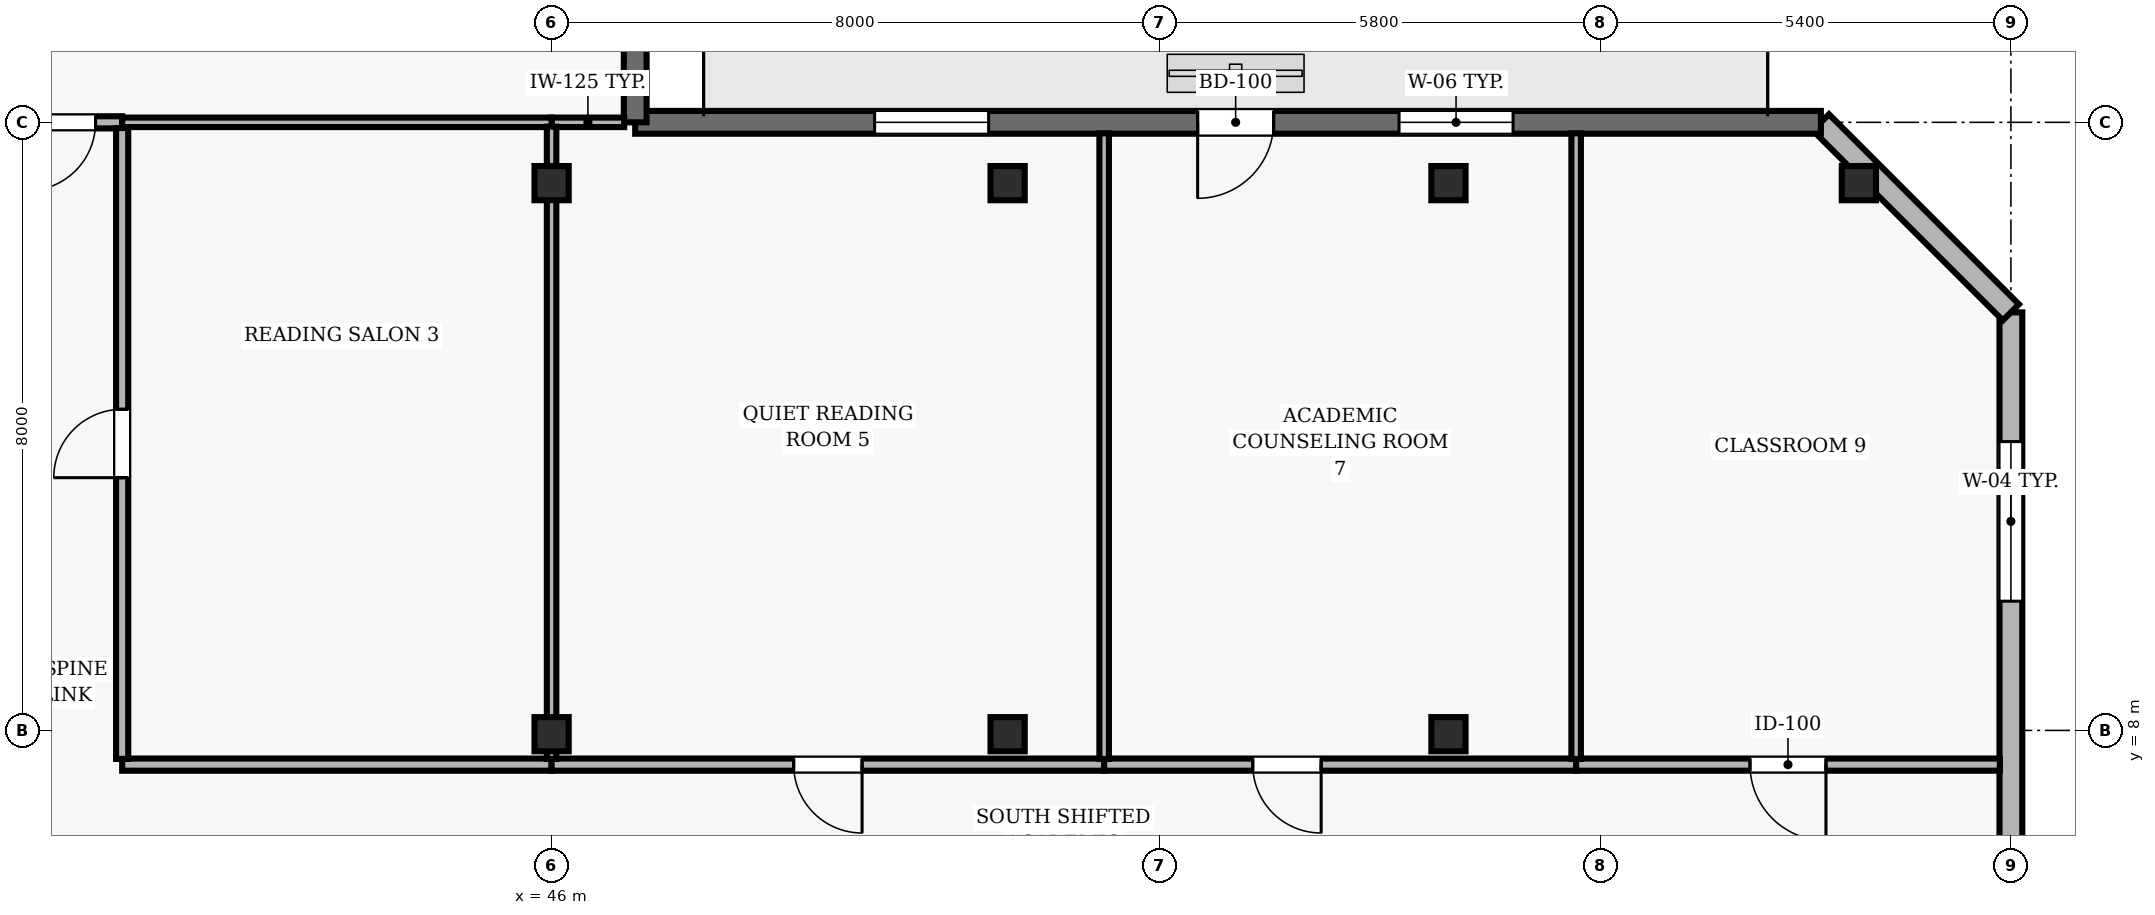
"""IFC4 building model, lengths in metres.
Left out: names, types, materials, properties, quantities, classifications, styles, units other than length and angle.
Written with IfcOpenShell. Run it as: python <this file> out.ifc"""

import sys

from ifc_helpers import new_model, si_unit, direction, frame, frame_2d, origin, origin_2d, place, context, subcontext, project, spatial, rectangle, hollow_rectangle, extrude, element, fill, save


model = new_model("IFC4")
c1 = context("Model", 3, precision=1e-05, world=origin(), true_north=direction((0.0, 1.0)))
c2 = subcontext(c1, "Body", "Model", "MODEL_VIEW")
j1 = project(units=[si_unit("LENGTHUNIT", "METRE"), si_unit("PLANEANGLEUNIT", "RADIAN")], contexts=[c1])
p1 = place(None, origin())
s1 = spatial("IfcSite", under=j1, at=p1, CompositionType="ELEMENT")
p2 = place(p1, origin())
s2 = spatial("IfcBuilding", under=s1, at=p2, CompositionType="ELEMENT")
p3 = place(p2, frame((0.0, 0.0, 203.1)))
s3 = spatial("IfcBuildingStorey", under=s2, at=p3, CompositionType="ELEMENT", Elevation=203.1)
for number, where, z_axis, x_axis in (
    (1, (46.0, 7.95, 0.0), (0.0, 0.0, 1.0), (1.0, 0.0, 0.0)),
    (2, (46.0, 15.2, 0.0), (0.0, 0.0, 1.0), (1.0, 0.0, 0.0)),
    (3, (52.0, 7.95, 0.0), (0.0, 0.0, 1.0), (1.0, 0.0, 0.0)),
    (4, (52.0, 15.2, 0.0), (0.0, 0.0, 1.0), (1.0, 0.0, 0.0)),
    (5, (57.8, 7.95, 0.0), (0.0, 0.0, 1.0), (1.0, 0.0, 0.0)),
    (6, (57.8, 15.2, 0.0), (0.0, 0.0, 1.0), (1.0, 0.0, 0.0)),
    (7, (63.2, 15.2, 0.0), (0.0, 0.0, 1.0), (1.0, 0.0, 0.0)),
):
    element("IfcColumn", number, at=place(p3, frame(where, z_axis=z_axis, x_axis=x_axis)), inside=s3, PredefinedType="COLUMN", context=c2, shape_type="SweptSolid", body=[
        extrude(hollow_rectangle(XDim=0.45, YDim=0.45, WallThickness=0.02, at=origin_2d()), origin(), (0.0, 0.0, 1.0), 3.9),
    ])
p4 = place(p3, frame((65.2, 2.5, 0.0), z_axis=(0.0, 0.0, 1.0), x_axis=(0.0, 1.0, 0.0)))
e8 = element("IfcWall", 8, at=p4, inside=s3, PredefinedType="SOLIDWALL", context=c2, shape_type="SweptSolid", body=[
    extrude(rectangle(XDim=11.0, YDim=0.3, at=frame_2d((5.5, 0.0))), origin(), (0.0, 0.0, 1.0), 3.69),
])
p5 = place(p4, frame((7.2, 0.0, 0.9)))
e9 = element("IfcOpeningElement", 9, at=p5, cuts=e8, PredefinedType="OPENING", context=c2, shape_type="SweptSolid", body=[
    extrude(rectangle(XDim=2.1, YDim=1.6, at=frame_2d((1.05, 0.8))), frame((0.0, 0.16, 0.0), z_axis=(0.0, -1.0, 0.0), x_axis=(1.0, 0.0, 0.0)), (0.0, 0.0, 1.0), 0.32),
])
p6 = place(p3, frame((65.2, 13.5, 0.0), z_axis=(0.0, 0.0, 1.0), x_axis=(-0.707106781187, 0.707106781187, 0.0)))
e10 = element("IfcWall", 10, at=p6, inside=s3, PredefinedType="SOLIDWALL", context=c2, shape_type="SweptSolid", body=[
    extrude(rectangle(XDim=3.536, YDim=0.3, at=frame_2d((1.768, 0.0))), origin(), (0.0, 0.0, 1.0), 3.69),
])
p7 = place(p3, frame((62.7, 16.0, 0.0), z_axis=(0.0, 0.0, 1.0), x_axis=(-1.0, 0.0, 0.0)))
e11 = element("IfcWall", 11, at=p7, inside=s3, PredefinedType="SOLIDWALL", context=c2, shape_type="SweptSolid", body=[
    extrude(rectangle(XDim=15.6, YDim=0.3, at=frame_2d((7.8, 0.0))), origin(), (0.0, 0.0, 1.0), 3.69),
])
p8 = place(p7, frame((7.2, 0.0, 0.0)))
e12 = element("IfcOpeningElement", 12, at=p8, cuts=e11, PredefinedType="OPENING", context=c2, shape_type="SweptSolid", body=[
    extrude(rectangle(XDim=1.0, YDim=2.2, at=frame_2d((0.5, 1.1))), frame((0.0, 0.16, 0.0), z_axis=(0.0, -1.0, 0.0), x_axis=(1.0, 0.0, 0.0)), (0.0, 0.0, 1.0), 0.32),
])
p9 = place(p7, frame((4.05, 0.0, 0.9)))
e13 = element("IfcOpeningElement", 13, at=p9, cuts=e11, PredefinedType="OPENING", context=c2, shape_type="SweptSolid", body=[
    extrude(rectangle(XDim=1.5, YDim=1.8, at=frame_2d((0.75, 0.9))), frame((0.0, 0.16, 0.0), z_axis=(0.0, -1.0, 0.0), x_axis=(1.0, 0.0, 0.0)), (0.0, 0.0, 1.0), 0.32),
])
p10 = place(p7, frame((10.95, 0.0, 0.9)))
e14 = element("IfcOpeningElement", 14, at=p10, cuts=e11, PredefinedType="OPENING", context=c2, shape_type="SweptSolid", body=[
    extrude(rectangle(XDim=1.5, YDim=1.8, at=frame_2d((0.75, 0.9))), frame((0.0, 0.16, 0.0), z_axis=(0.0, -1.0, 0.0), x_axis=(1.0, 0.0, 0.0)), (0.0, 0.0, 1.0), 0.32),
])
p11 = place(p3, frame((47.1, 16.0, 0.0), z_axis=(0.0, 0.0, 1.0), x_axis=(0.0, 1.0, 0.0)))
e15 = element("IfcWall", 15, at=p11, inside=s3, PredefinedType="SOLIDWALL", context=c2, shape_type="SweptSolid", body=[
    extrude(rectangle(XDim=6.135, YDim=0.3, at=frame_2d((3.067, 0.0))), origin(), (0.0, 0.0, 1.0), 3.69),
])
p12 = place(p11, frame((2.168, 0.0, 0.9)))
e16 = element("IfcOpeningElement", 16, at=p12, cuts=e15, PredefinedType="OPENING", context=c2, shape_type="SweptSolid", body=[
    extrude(rectangle(XDim=1.8, YDim=1.8, at=frame_2d((0.9, 0.9))), frame((0.0, 0.16, 0.0), z_axis=(0.0, -1.0, 0.0), x_axis=(1.0, 0.0, 0.0)), (0.0, 0.0, 1.0), 0.32),
])
p13 = place(p3, frame((40.35, 16.0, 0.0), z_axis=(0.0, 0.0, 1.0), x_axis=(-1.0, 0.0, 0.0)))
e17 = element("IfcWall", 17, at=p13, inside=s3, PredefinedType="PARTITIONING", context=c2, shape_type="SweptSolid", body=[
    extrude(rectangle(XDim=2.3, YDim=0.16, at=frame_2d((1.15, 0.0))), origin(), (0.0, 0.0, 1.0), 3.39),
])
p14 = place(p13, frame((0.35, 0.0, 0.0)))
e18 = element("IfcOpeningElement", 18, at=p14, cuts=e17, PredefinedType="OPENING", context=c2, shape_type="SweptSolid", body=[
    extrude(rectangle(XDim=0.9, YDim=2.1, at=frame_2d((0.45, 1.05))), frame((0.0, 0.09, 0.0), z_axis=(0.0, -1.0, 0.0), x_axis=(1.0, 0.0, 0.0)), (0.0, 0.0, 1.0), 0.18),
])
p15 = place(p3, frame((46.0, 7.55, 0.0), z_axis=(0.0, 0.0, 1.0), x_axis=(-1.0, 0.0, 0.0)))
e19 = element("IfcWall", 19, at=p15, inside=s3, PredefinedType="PARTITIONING", context=c2, shape_type="SweptSolid", body=[
    extrude(rectangle(XDim=5.65, YDim=0.16, at=frame_2d((2.825, 0.0))), origin(), (0.0, 0.0, 1.0), 3.146),
])
p16 = place(p3, frame((46.0, 16.0, 0.0), z_axis=(0.0, 0.0, 1.0), x_axis=(1.0, 0.0, 0.0)))
e20 = element("IfcWall", 20, at=p16, inside=s3, PredefinedType="PARTITIONING", context=c2, shape_type="SweptSolid", body=[
    extrude(rectangle(XDim=0.955, YDim=0.125, at=frame_2d((0.478, 0.0))), origin(), (0.0, 0.0, 1.0), 3.39),
])
p17 = place(p3, frame((46.0, 16.0, 0.0), z_axis=(0.0, 0.0, 1.0), x_axis=(-1.0, 0.0, 0.0)))
e21 = element("IfcWall", 21, at=p17, inside=s3, PredefinedType="PARTITIONING", context=c2, shape_type="SweptSolid", body=[
    extrude(rectangle(XDim=5.65, YDim=0.125, at=frame_2d((2.825, 0.0))), origin(), (0.0, 0.0, 1.0), 3.39),
])
p18 = place(p3, frame((53.27, 7.55, 0.0), z_axis=(0.0, 0.0, 1.0), x_axis=(-1.0, 0.0, 0.0)))
e22 = element("IfcWall", 22, at=p18, inside=s3, PredefinedType="PARTITIONING", context=c2, shape_type="SweptSolid", body=[
    extrude(rectangle(XDim=7.27, YDim=0.16, at=frame_2d((3.635, 0.0))), origin(), (0.0, 0.0, 1.0), 3.146),
])
p19 = place(p18, frame((3.185, 0.0, 0.0)))
e23 = element("IfcOpeningElement", 23, at=p19, cuts=e22, PredefinedType="OPENING", context=c2, shape_type="SweptSolid", body=[
    extrude(rectangle(XDim=0.9, YDim=2.1, at=frame_2d((0.45, 1.05))), frame((0.0, 0.09, 0.0), z_axis=(0.0, -1.0, 0.0), x_axis=(1.0, 0.0, 0.0)), (0.0, 0.0, 1.0), 0.18),
])
p20 = place(p3, frame((59.48, 7.55, 0.0), z_axis=(0.0, 0.0, 1.0), x_axis=(-1.0, 0.0, 0.0)))
e24 = element("IfcWall", 24, at=p20, inside=s3, PredefinedType="PARTITIONING", context=c2, shape_type="SweptSolid", body=[
    extrude(rectangle(XDim=6.21, YDim=0.16, at=frame_2d((3.105, 0.0))), origin(), (0.0, 0.0, 1.0), 3.146),
])
p21 = place(p20, frame((3.355, 0.0, 0.0)))
e25 = element("IfcOpeningElement", 25, at=p21, cuts=e24, PredefinedType="OPENING", context=c2, shape_type="SweptSolid", body=[
    extrude(rectangle(XDim=0.9, YDim=2.1, at=frame_2d((0.45, 1.05))), frame((0.0, 0.09, 0.0), z_axis=(0.0, -1.0, 0.0), x_axis=(1.0, 0.0, 0.0)), (0.0, 0.0, 1.0), 0.18),
])
p22 = place(p3, frame((65.055, 7.55, 0.0), z_axis=(0.0, 0.0, 1.0), x_axis=(-1.0, 0.0, 0.0)))
e26 = element("IfcWall", 26, at=p22, inside=s3, PredefinedType="PARTITIONING", context=c2, shape_type="SweptSolid", body=[
    extrude(rectangle(XDim=5.575, YDim=0.16, at=frame_2d((2.788, 0.0))), origin(), (0.0, 0.0, 1.0), 3.69),
])
p23 = place(p22, frame((2.288, 0.0, 0.0)))
e27 = element("IfcOpeningElement", 27, at=p23, cuts=e26, PredefinedType="OPENING", context=c2, shape_type="SweptSolid", body=[
    extrude(rectangle(XDim=1.0, YDim=2.1, at=frame_2d((0.5, 1.05))), frame((0.0, 0.09, 0.0), z_axis=(0.0, -1.0, 0.0), x_axis=(1.0, 0.0, 0.0)), (0.0, 0.0, 1.0), 0.18),
])
p24 = place(p3, frame((40.35, 7.625, 0.0), z_axis=(0.0, 0.0, 1.0), x_axis=(0.0, 1.0, 0.0)))
e28 = element("IfcWall", 28, at=p24, inside=s3, PredefinedType="PARTITIONING", context=c2, shape_type="SweptSolid", body=[
    extrude(rectangle(XDim=8.3, YDim=0.16, at=frame_2d((4.15, 0.0))), origin(), (0.0, 0.0, 1.0), 3.372),
])
p25 = place(p24, frame((3.7, 0.0, 0.0)))
e29 = element("IfcOpeningElement", 29, at=p25, cuts=e28, PredefinedType="OPENING", context=c2, shape_type="SweptSolid", body=[
    extrude(rectangle(XDim=0.9, YDim=2.1, at=frame_2d((0.45, 1.05))), frame((0.0, 0.09, 0.0), z_axis=(0.0, -1.0, 0.0), x_axis=(1.0, 0.0, 0.0)), (0.0, 0.0, 1.0), 0.18),
])
p26 = place(p3, frame((46.0, 7.625, 0.0), z_axis=(0.0, 0.0, 1.0), x_axis=(0.0, 1.0, 0.0)))
e30 = element("IfcWall", 30, at=p26, inside=s3, PredefinedType="PARTITIONING", context=c2, shape_type="SweptSolid", body=[
    extrude(rectangle(XDim=8.318, YDim=0.125, at=frame_2d((4.159, 0.0))), origin(), (0.0, 0.0, 1.0), 3.146),
])
for number, where, z_axis, x_axis in (
    (31, (53.27, 7.625, 0.0), (0.0, 0.0, 1.0), (0.0, 1.0, 0.0)),
    (32, (59.48, 7.625, 0.0), (0.0, 0.0, 1.0), (0.0, 1.0, 0.0)),
):
    element("IfcWall", number, at=place(p3, frame(where, z_axis=z_axis, x_axis=x_axis)), inside=s3, PredefinedType="PARTITIONING", context=c2, shape_type="SweptSolid", body=[
        extrude(rectangle(XDim=8.23, YDim=0.125, at=frame_2d((4.115, 0.0))), origin(), (0.0, 0.0, 1.0), 3.69),
    ])
p27 = place(p5, origin())
e33 = element("IfcWindow", 33, at=p27, inside=s3, PartitioningType="SINGLE_PANEL", PredefinedType="WINDOW", context=c2, shape_type="SweptSolid", body=[
    extrude(rectangle(XDim=2.1, YDim=1.6, at=frame_2d((1.05, 0.8))), frame((0.0, 0.03, 0.0), z_axis=(0.0, -1.0, 0.0), x_axis=(1.0, 0.0, 0.0)), (0.0, 0.0, 1.0), 0.06),
])
fill(e9, e33)
p28 = place(p8, origin())
e34 = element("IfcDoor", 34, at=p28, inside=s3, OperationType="SINGLE_SWING_RIGHT", PredefinedType="DOOR", context=c2, shape_type="SweptSolid", body=[
    extrude(rectangle(XDim=1.0, YDim=2.2, at=frame_2d((0.5, 1.1))), frame((0.0, 0.025, 0.0), z_axis=(0.0, -1.0, 0.0), x_axis=(1.0, 0.0, 0.0)), (0.0, 0.0, 1.0), 0.05),
])
fill(e12, e34)
p29 = place(p9, origin())
e35 = element("IfcWindow", 35, at=p29, inside=s3, PartitioningType="SINGLE_PANEL", PredefinedType="WINDOW", context=c2, shape_type="SweptSolid", body=[
    extrude(rectangle(XDim=1.5, YDim=1.8, at=frame_2d((0.75, 0.9))), frame((0.0, 0.03, 0.0), z_axis=(0.0, -1.0, 0.0), x_axis=(1.0, 0.0, 0.0)), (0.0, 0.0, 1.0), 0.06),
])
fill(e13, e35)
p30 = place(p10, origin())
e36 = element("IfcWindow", 36, at=p30, inside=s3, PartitioningType="SINGLE_PANEL", PredefinedType="WINDOW", context=c2, shape_type="SweptSolid", body=[
    extrude(rectangle(XDim=1.5, YDim=1.8, at=frame_2d((0.75, 0.9))), frame((0.0, 0.03, 0.0), z_axis=(0.0, -1.0, 0.0), x_axis=(1.0, 0.0, 0.0)), (0.0, 0.0, 1.0), 0.06),
])
fill(e14, e36)
p31 = place(p25, origin())
e37 = element("IfcDoor", 37, at=p31, inside=s3, OperationType="SINGLE_SWING_LEFT", PredefinedType="DOOR", context=c2, shape_type="SweptSolid", body=[
    extrude(rectangle(XDim=0.9, YDim=2.1, at=frame_2d((0.45, 1.05))), frame((0.0, 0.025, 0.0), z_axis=(0.0, -1.0, 0.0), x_axis=(1.0, 0.0, 0.0)), (0.0, 0.0, 1.0), 0.05),
])
fill(e29, e37)
p32 = place(p19, origin())
e38 = element("IfcDoor", 38, at=p32, inside=s3, OperationType="SINGLE_SWING_LEFT", PredefinedType="DOOR", context=c2, shape_type="SweptSolid", body=[
    extrude(rectangle(XDim=0.9, YDim=2.1, at=frame_2d((0.45, 1.05))), frame((0.0, 0.025, 0.0), z_axis=(0.0, -1.0, 0.0), x_axis=(1.0, 0.0, 0.0)), (0.0, 0.0, 1.0), 0.05),
])
fill(e23, e38)
p33 = place(p21, origin())
e39 = element("IfcDoor", 39, at=p33, inside=s3, OperationType="SINGLE_SWING_LEFT", PredefinedType="DOOR", context=c2, shape_type="SweptSolid", body=[
    extrude(rectangle(XDim=0.9, YDim=2.1, at=frame_2d((0.45, 1.05))), frame((0.0, 0.025, 0.0), z_axis=(0.0, -1.0, 0.0), x_axis=(1.0, 0.0, 0.0)), (0.0, 0.0, 1.0), 0.05),
])
fill(e25, e39)
p34 = place(p23, origin())
e40 = element("IfcDoor", 40, at=p34, inside=s3, OperationType="SINGLE_SWING_LEFT", PredefinedType="DOOR", context=c2, shape_type="SweptSolid", body=[
    extrude(rectangle(XDim=1.0, YDim=2.1, at=frame_2d((0.5, 1.05))), frame((0.0, 0.025, 0.0), z_axis=(0.0, -1.0, 0.0), x_axis=(1.0, 0.0, 0.0)), (0.0, 0.0, 1.0), 0.05),
])
fill(e27, e40)
p35 = place(p14, origin())
e41 = element("IfcDoor", 41, at=p35, inside=s3, OperationType="SINGLE_SWING_RIGHT", PredefinedType="DOOR", context=c2, shape_type="SweptSolid", body=[
    extrude(rectangle(XDim=0.9, YDim=2.1, at=frame_2d((0.45, 1.05))), frame((0.0, 0.025, 0.0), z_axis=(0.0, -1.0, 0.0), x_axis=(1.0, 0.0, 0.0)), (0.0, 0.0, 1.0), 0.05),
])
fill(e18, e41)
save(model, sys.argv[1])
